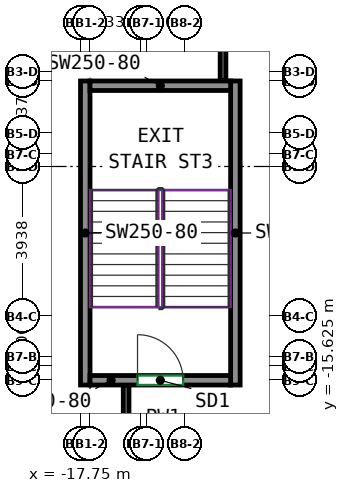
"""IFC4 building model, lengths in metres.
Left out: names, types, materials, properties, quantities, classifications, styles, units other than length and angle.
Written with IfcOpenShell. Run it as: python <this file> out.ifc"""

import sys

from ifc_helpers import new_model, si_unit, direction, frame, frame_2d, origin, place, context, subcontext, project, spatial, rectangle, extrude, source, transform, mapped, element, fill, save


model = new_model("IFC4")
c1 = context("Model", 3, precision=1e-05, world=origin(), true_north=direction((0.0, 1.0)))
c2 = subcontext(c1, "Body", "Model", "MODEL_VIEW")
j1 = project(units=[si_unit("LENGTHUNIT", "METRE"), si_unit("PLANEANGLEUNIT", "RADIAN")], contexts=[c1])
p1 = place(None, origin())
s1 = spatial("IfcSite", under=j1, at=p1, CompositionType="ELEMENT")
p2 = place(p1, origin())
s2 = spatial("IfcBuilding", under=s1, at=p2, CompositionType="ELEMENT")
p3 = place(p2, frame((0.0, 0.0, 39.0)))
s3 = spatial("IfcBuildingStorey", under=s2, at=p3, CompositionType="ELEMENT", Elevation=39.0)
m1 = source(origin(), c2, "Body", "SweptSolid", [
    extrude(rectangle(XDim=8.0, YDim=0.25, at=frame_2d((4.0, 0.0))), origin(), (0.0, 0.0, 1.0), 3.72),
])
for number, where, z_axis, x_axis in (
    (1, (-17.625, -15.75, 0.0), (0.0, 0.0, 1.0), (0.0, 1.0, 0.0)),
    (2, (-13.675, -15.75, 0.0), (0.0, 0.0, 1.0), (0.0, 1.0, 0.0)),
):
    element("IfcWall", number, at=place(p3, frame(where, z_axis=z_axis, x_axis=x_axis)), inside=s3, PredefinedType="SHEAR", context=c2, shape_type="MappedRepresentation", body=[
        mapped(m1, transform((0.0, 0.0, 0.0))),
    ])
m2 = source(origin(), c2, "Body", "SweptSolid", [
    extrude(rectangle(XDim=3.7, YDim=0.25, at=frame_2d((1.85, 0.0))), origin(), (0.0, 0.0, 1.0), 3.72),
])
p4 = place(p3, frame((-17.5, -15.625, 0.0), z_axis=(0.0, 0.0, 1.0), x_axis=(1.0, 0.0, 0.0)))
e3 = element("IfcWall", 3, at=p4, inside=s3, PredefinedType="SHEAR", context=c2, shape_type="MappedRepresentation", body=[
    mapped(m2, transform((0.0, 0.0, 0.0))),
])
p5 = place(p4, frame((1.25, 0.0, 0.0)))
e4 = element("IfcOpeningElement", 4, at=p5, cuts=e3, PredefinedType="OPENING", context=c2, shape_type="SweptSolid", body=[
    extrude(rectangle(XDim=1.2, YDim=2.1, at=frame_2d((0.6, 1.05))), frame((0.0, 0.135, 0.0), z_axis=(0.0, -1.0, 0.0), x_axis=(1.0, 0.0, 0.0)), (0.0, 0.0, 1.0), 0.27),
])
p6 = place(p3, frame((-17.5, -7.875, 0.0), z_axis=(0.0, 0.0, 1.0), x_axis=(1.0, 0.0, 0.0)))
e5 = element("IfcWall", 5, at=p6, inside=s3, PredefinedType="SHEAR", context=c2, shape_type="MappedRepresentation", body=[
    mapped(m2, transform((0.0, 0.0, 0.0))),
])
p7 = place(p3, frame((-16.55, -15.75, 0.0), z_axis=(0.0, 0.0, 1.0), x_axis=(0.0, -1.0, 0.0)))
e6 = element("IfcWall", 6, at=p7, inside=s3, PredefinedType="PARTITIONING", context=c2, shape_type="SweptSolid", body=[
    extrude(rectangle(XDim=1.725, YDim=0.15, at=frame_2d((0.863, 0.0))), origin(), (0.0, 0.0, 1.0), 3.72),
])
p8 = place(p3, frame((-14.0, -1.075, 0.0), z_axis=(0.0, 0.0, 1.0), x_axis=(0.0, -1.0, 0.0)))
e7 = element("IfcWall", 7, at=p8, inside=s3, PredefinedType="PARTITIONING", context=c2, shape_type="SweptSolid", body=[
    extrude(rectangle(XDim=6.675, YDim=0.15, at=frame_2d((3.337, 0.0))), origin(), (0.0, 0.0, 1.0), 3.72),
])
p9 = place(p5, origin())
e8 = element("IfcDoor", 8, at=p9, inside=s3, OperationType="DOUBLE_DOOR_SINGLE_SWING", PredefinedType="DOOR", context=c2, shape_type="SweptSolid", body=[
    extrude(rectangle(XDim=1.2, YDim=2.1, at=frame_2d((0.6, 1.05))), frame((0.0, 0.025, 0.0), z_axis=(0.0, -1.0, 0.0), x_axis=(1.0, 0.0, 0.0)), (0.0, 0.0, 1.0), 0.05),
])
fill(e4, e8)
save(model, sys.argv[1])
